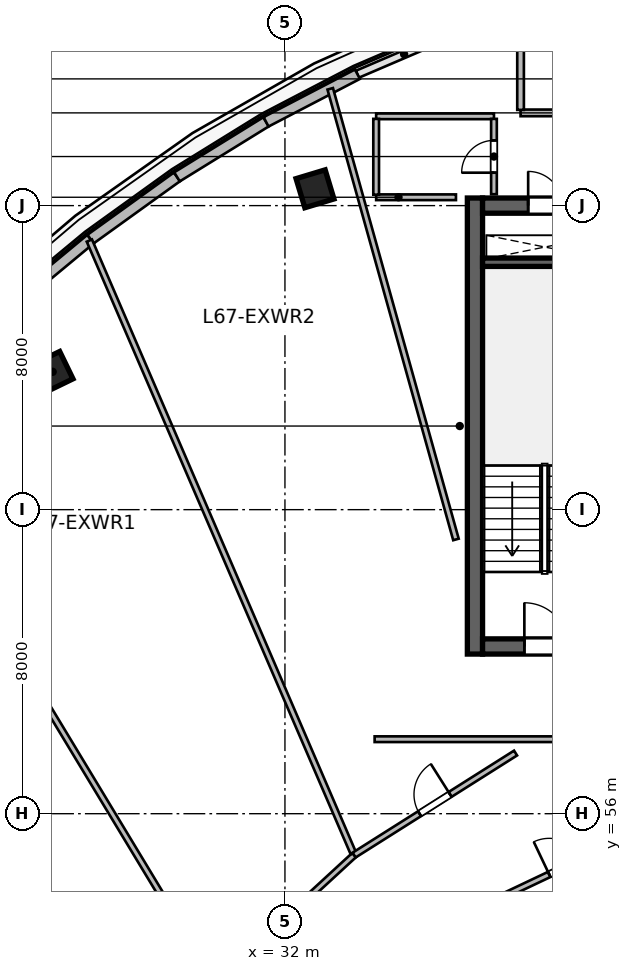
"""IFC4 building model, lengths in metres.
Left out: names, types, materials, properties, quantities, classifications, styles, units other than length and angle.
Written with IfcOpenShell. Run it as: python <this file> out.ifc"""

import sys

from ifc_helpers import new_model, si_unit, direction, frame, frame_2d, origin, origin_2d, place, context, subcontext, project, spatial, rectangle, extrude, source, transform, mapped, element, fill, save


model = new_model("IFC4")
c1 = context("Model", 3, precision=1e-05, world=origin(), true_north=direction((0.0, 1.0)))
c2 = subcontext(c1, "Body", "Model", "MODEL_VIEW")
j1 = project(units=[si_unit("LENGTHUNIT", "METRE"), si_unit("PLANEANGLEUNIT", "RADIAN")], contexts=[c1])
p1 = place(None, origin())
s1 = spatial("IfcSite", under=j1, at=p1, CompositionType="ELEMENT")
p2 = place(p1, origin())
s2 = spatial("IfcBuilding", under=s1, at=p2, CompositionType="ELEMENT")
p3 = place(p2, frame((0.0, 0.0, 275.7)))
s3 = spatial("IfcBuildingStorey", under=s2, at=p3, CompositionType="ELEMENT", Elevation=275.7)
m1 = source(origin(), c2, "Body", "SweptSolid", [
    extrude(rectangle(XDim=12.0, YDim=0.4, at=frame_2d((6.0, 0.0))), origin(), (0.0, 0.0, 1.0), 3.9),
])
p4 = place(p3, frame((37.0, 60.2, 0.0), z_axis=(0.0, 0.0, 1.0), x_axis=(0.0, 1.0, 0.0)))
e1 = element("IfcWall", 1, at=p4, inside=s3, PredefinedType="SHEAR", context=c2, shape_type="MappedRepresentation", body=[
    mapped(m1, transform((0.0, 0.0, 0.0), scale=1.0)),
])
m2 = source(origin(), c2, "Body", "SweptSolid", [
    extrude(rectangle(XDim=21.6, YDim=0.4, at=frame_2d((10.8, 0.0))), origin(), (0.0, 0.0, 1.0), 3.9),
])
p5 = place(p3, frame((37.2, 60.4, 0.0), z_axis=(0.0, 0.0, 1.0), x_axis=(1.0, 0.0, 0.0)))
e2 = element("IfcWall", 2, at=p5, inside=s3, PredefinedType="SHEAR", context=c2, shape_type="MappedRepresentation", body=[
    mapped(m2, transform((0.0, 0.0, 0.0), scale=1.0)),
])
p6 = place(p5, frame((1.1, 0.0, 0.0)))
e3 = element("IfcOpeningElement", 3, at=p6, cuts=e2, PredefinedType="OPENING", context=c2, shape_type="SweptSolid", body=[
    extrude(rectangle(XDim=1.15, YDim=2.15, at=frame_2d((0.575, 1.075))), frame((0.0, 0.21, 0.0), z_axis=(0.0, -1.0, 0.0), x_axis=(1.0, 0.0, 0.0)), (0.0, 0.0, 1.0), 0.42),
])
p7 = place(p5, frame((19.5, 0.0, 0.0)))
e4 = element("IfcOpeningElement", 4, at=p7, cuts=e2, PredefinedType="OPENING", context=c2, shape_type="SweptSolid", body=[
    extrude(rectangle(XDim=0.9, YDim=2.1, at=frame_2d((0.45, 1.05))), frame((0.0, 0.21, 0.0), z_axis=(0.0, -1.0, 0.0), x_axis=(1.0, 0.0, 0.0)), (0.0, 0.0, 1.0), 0.42),
])
p8 = place(p5, frame((12.02, 0.0, 0.0)))
e5 = element("IfcOpeningElement", 5, at=p8, cuts=e2, PredefinedType="OPENING", context=c2, shape_type="SweptSolid", body=[
    extrude(rectangle(XDim=1.6, YDim=2.15, at=frame_2d((0.8, 1.075))), frame((0.0, 0.21, 0.0), z_axis=(0.0, -1.0, 0.0), x_axis=(1.0, 0.0, 0.0)), (0.0, 0.0, 1.0), 0.42),
])
p9 = place(p3, frame((37.2, 72.0, 0.0), z_axis=(0.0, 0.0, 1.0), x_axis=(1.0, 0.0, 0.0)))
e6 = element("IfcWall", 6, at=p9, inside=s3, PredefinedType="SHEAR", context=c2, shape_type="MappedRepresentation", body=[
    mapped(m2, transform((0.0, 0.0, 0.0), scale=1.0)),
])
p10 = place(p9, frame((1.2, 0.0, 0.0)))
e7 = element("IfcOpeningElement", 7, at=p10, cuts=e6, PredefinedType="OPENING", context=c2, shape_type="SweptSolid", body=[
    extrude(rectangle(XDim=0.9, YDim=2.1, at=frame_2d((0.45, 1.05))), frame((0.0, 0.21, 0.0), z_axis=(0.0, -1.0, 0.0), x_axis=(1.0, 0.0, 0.0)), (0.0, 0.0, 1.0), 0.42),
])
p11 = place(p9, frame((14.7, 0.0, 0.0)))
e8 = element("IfcOpeningElement", 8, at=p11, cuts=e6, PredefinedType="OPENING", context=c2, shape_type="SweptSolid", body=[
    extrude(rectangle(XDim=1.2, YDim=2.15, at=frame_2d((0.6, 1.075))), frame((0.0, 0.21, 0.0), z_axis=(0.0, -1.0, 0.0), x_axis=(1.0, 0.0, 0.0)), (0.0, 0.0, 1.0), 0.42),
])
p12 = place(p9, frame((4.15, 0.0, 0.0)))
e9 = element("IfcOpeningElement", 9, at=p12, cuts=e6, PredefinedType="OPENING", context=c2, shape_type="SweptSolid", body=[
    extrude(rectangle(XDim=1.3, YDim=2.15, at=frame_2d((0.65, 1.075))), frame((0.0, 0.21, 0.0), z_axis=(0.0, -1.0, 0.0), x_axis=(1.0, 0.0, 0.0)), (0.0, 0.0, 1.0), 0.42),
])
p13 = place(p9, frame((6.76, 0.0, 0.0)))
e10 = element("IfcOpeningElement", 10, at=p13, cuts=e6, PredefinedType="OPENING", context=c2, shape_type="SweptSolid", body=[
    extrude(rectangle(XDim=0.85, YDim=2.1, at=frame_2d((0.425, 1.05))), frame((0.0, 0.21, 0.0), z_axis=(0.0, -1.0, 0.0), x_axis=(1.0, 0.0, 0.0)), (0.0, 0.0, 1.0), 0.42),
])
p14 = place(p9, frame((8.76, 0.0, 0.0)))
e11 = element("IfcOpeningElement", 11, at=p14, cuts=e6, PredefinedType="OPENING", context=c2, shape_type="SweptSolid", body=[
    extrude(rectangle(XDim=0.85, YDim=2.1, at=frame_2d((0.425, 1.05))), frame((0.0, 0.21, 0.0), z_axis=(0.0, -1.0, 0.0), x_axis=(1.0, 0.0, 0.0)), (0.0, 0.0, 1.0), 0.42),
])
p15 = place(p9, frame((10.725, 0.0, 0.0)))
e12 = element("IfcOpeningElement", 12, at=p15, cuts=e6, PredefinedType="OPENING", context=c2, shape_type="SweptSolid", body=[
    extrude(rectangle(XDim=0.85, YDim=2.1, at=frame_2d((0.425, 1.05))), frame((0.0, 0.21, 0.0), z_axis=(0.0, -1.0, 0.0), x_axis=(1.0, 0.0, 0.0)), (0.0, 0.0, 1.0), 0.42),
])
m3 = source(origin(), c2, "Body", "SweptSolid", [
    extrude(rectangle(XDim=3.27, YDim=0.22, at=frame_2d((1.635, 0.0))), origin(), (0.0, 0.0, 1.0), 3.9),
])
p16 = place(p3, frame((37.2, 70.51, 0.0), z_axis=(0.0, 0.0, 1.0), x_axis=(1.0, 0.0, 0.0)))
e13 = element("IfcWall", 13, at=p16, inside=s3, PredefinedType="SHEAR", context=c2, shape_type="MappedRepresentation", body=[
    mapped(m3, transform((0.0, 0.0, 0.0), scale=1.0)),
])
m4 = source(origin(), c2, "Body", "SweptSolid", [
    extrude(rectangle(XDim=0.8, YDim=0.8, at=origin_2d()), origin(), (0.0, 0.0, 1.0), 3.9),
])
for number, where, z_axis, x_axis in (
    (14, (25.888, 67.627, 0.0), (0.0, 0.0, 1.0), (-0.436, 0.9, 0.0)),
    (15, (32.791, 72.442, 0.0), (0.0, 0.0, 1.0), (-0.289, 0.957, 0.0)),
):
    element("IfcColumn", number, at=place(p3, frame(where, z_axis=z_axis, x_axis=x_axis)), inside=s3, PredefinedType="COLUMN", context=c2, shape_type="MappedRepresentation", body=[
        mapped(m4, transform((0.0, 0.0, 0.0), scale=1.0)),
    ])
m5 = source(origin(), c2, "Body", "SweptSolid", [
    extrude(rectangle(XDim=2.852, YDim=0.28, at=frame_2d((1.426, 0.0))), origin(), (0.0, 0.0, 1.0), 3.64),
])
p17 = place(p3, frame((24.69, 69.299, 0.0), z_axis=(0.0, 0.0, 1.0), x_axis=(0.769783606009, 0.638304942735, 0.0)))
e16 = element("IfcWall", 16, at=p17, inside=s3, PredefinedType="SOLIDWALL", context=c2, shape_type="MappedRepresentation", body=[
    mapped(m5, transform((0.0, 0.0, 0.0), scale=1.0)),
])
m6 = source(origin(), c2, "Body", "SweptSolid", [
    extrude(rectangle(XDim=2.802, YDim=0.28, at=frame_2d((1.401, 0.0))), origin(), (0.0, 0.0, 1.0), 3.64),
])
p18 = place(p3, frame((26.885, 71.12, 0.0), z_axis=(0.0, 0.0, 1.0), x_axis=(0.811507896482, 0.584341453217, 0.0)))
e17 = element("IfcWall", 17, at=p18, inside=s3, PredefinedType="SOLIDWALL", context=c2, shape_type="MappedRepresentation", body=[
    mapped(m6, transform((0.0, 0.0, 0.0), scale=1.0)),
])
m7 = source(origin(), c2, "Body", "SweptSolid", [
    extrude(rectangle(XDim=2.755, YDim=0.28, at=frame_2d((1.377, 0.0))), origin(), (0.0, 0.0, 1.0), 3.64),
])
p19 = place(p3, frame((29.159, 72.757, 0.0), z_axis=(0.0, 0.0, 1.0), x_axis=(0.850750210743, 0.525570241661, 0.0)))
e18 = element("IfcWall", 18, at=p19, inside=s3, PredefinedType="SOLIDWALL", context=c2, shape_type="MappedRepresentation", body=[
    mapped(m7, transform((0.0, 0.0, 0.0), scale=1.0)),
])
m8 = source(origin(), c2, "Body", "SweptSolid", [
    extrude(rectangle(XDim=2.711, YDim=0.28, at=frame_2d((1.356, 0.0))), origin(), (0.0, 0.0, 1.0), 3.64),
])
p20 = place(p3, frame((31.502, 74.205, 0.0), z_axis=(0.0, 0.0, 1.0), x_axis=(0.886828760751, 0.462098202881, 0.0)))
e19 = element("IfcWall", 19, at=p20, inside=s3, PredefinedType="SOLIDWALL", context=c2, shape_type="MappedRepresentation", body=[
    mapped(m8, transform((0.0, 0.0, 0.0), scale=1.0)),
])
m9 = source(origin(), c2, "Body", "SweptSolid", [
    extrude(rectangle(XDim=2.1, YDim=0.15, at=frame_2d((1.05, 0.0))), origin(), (0.0, 0.0, 1.0), 3.64),
])
p21 = place(p3, frame((34.4, 72.22, 0.0), z_axis=(0.0, 0.0, 1.0), x_axis=(1.0, 0.0, 0.0)))
e20 = element("IfcWall", 20, at=p21, inside=s3, PredefinedType="PARTITIONING", context=c2, shape_type="MappedRepresentation", body=[
    mapped(m9, transform((0.0, 0.0, 0.0), scale=1.0)),
])
m10 = source(origin(), c2, "Body", "SweptSolid", [
    extrude(rectangle(XDim=3.1, YDim=0.15, at=frame_2d((1.55, 0.0))), origin(), (0.0, 0.0, 1.0), 3.071),
])
p22 = place(p3, frame((34.4, 74.35, 0.0), z_axis=(0.0, 0.0, 1.0), x_axis=(1.0, 0.0, 0.0)))
e21 = element("IfcWall", 21, at=p22, inside=s3, PredefinedType="PARTITIONING", context=c2, shape_type="MappedRepresentation", body=[
    mapped(m10, transform((0.0, 0.0, 0.0), scale=1.0)),
])
m11 = source(origin(), c2, "Body", "SweptSolid", [
    extrude(rectangle(XDim=1.995, YDim=0.15, at=frame_2d((0.998, 0.0))), origin(), (0.0, 0.0, 1.0), 3.64),
])
p23 = place(p3, frame((34.4, 72.288, 0.0), z_axis=(0.0, 0.0, 1.0), x_axis=(0.0, 1.0, 0.0)))
e22 = element("IfcWall", 22, at=p23, inside=s3, PredefinedType="PARTITIONING", context=c2, shape_type="MappedRepresentation", body=[
    mapped(m11, transform((0.0, 0.0, 0.0), scale=1.0)),
])
m12 = source(origin(), c2, "Body", "SweptSolid", [
    extrude(rectangle(XDim=1.982, YDim=0.15, at=frame_2d((0.991, 0.0))), origin(), (0.0, 0.0, 1.0), 3.64),
])
p24 = place(p3, frame((37.5, 72.3, 0.0), z_axis=(0.0, 0.0, 1.0), x_axis=(0.0, 1.0, 0.0)))
e23 = element("IfcWall", 23, at=p24, inside=s3, PredefinedType="PARTITIONING", context=c2, shape_type="MappedRepresentation", body=[
    mapped(m12, transform((0.0, 0.0, 0.0), scale=1.0)),
])
p25 = place(p24, frame((0.566, 0.0, 0.0)))
e24 = element("IfcOpeningElement", 24, at=p25, cuts=e23, PredefinedType="OPENING", context=c2, shape_type="SweptSolid", body=[
    extrude(rectangle(XDim=0.85, YDim=2.1, at=frame_2d((0.425, 1.05))), frame((0.0, 0.085, 0.0), z_axis=(0.0, -1.0, 0.0), x_axis=(1.0, 0.0, 0.0)), (0.0, 0.0, 1.0), 0.17),
])
m13 = source(origin(), c2, "Body", "SweptSolid", [
    extrude(rectangle(XDim=4.0, YDim=0.175, at=frame_2d((2.0, 0.0))), origin(), (0.0, 0.0, 1.0), 3.64),
])
p26 = place(p3, frame((38.2, 74.44, 0.0), z_axis=(0.0, 0.0, 1.0), x_axis=(1.0, 0.0, 0.0)))
e25 = element("IfcWall", 25, at=p26, inside=s3, PredefinedType="PARTITIONING", context=c2, shape_type="MappedRepresentation", body=[
    mapped(m13, transform((0.0, 0.0, 0.0), scale=1.0)),
])
p27 = place(p26, frame((2.7, 0.0, 0.0)))
e26 = element("IfcOpeningElement", 26, at=p27, cuts=e25, PredefinedType="OPENING", context=c2, shape_type="SweptSolid", body=[
    extrude(rectangle(XDim=0.9, YDim=2.08, at=frame_2d((0.45, 1.04))), frame((0.0, 0.098, 0.0), z_axis=(0.0, -1.0, 0.0), x_axis=(1.0, 0.0, 0.0)), (0.0, 0.0, 1.0), 0.195),
])
m14 = source(origin(), c2, "Body", "SweptSolid", [
    extrude(rectangle(XDim=2.403, YDim=0.175, at=frame_2d((1.201, 0.0))), origin(), (0.0, 0.0, 1.0), 3.64),
])
p28 = place(p3, frame((38.2, 74.519, 0.0), z_axis=(0.0, 0.0, 1.0), x_axis=(0.0, 1.0, 0.0)))
e27 = element("IfcWall", 27, at=p28, inside=s3, PredefinedType="PARTITIONING", context=c2, shape_type="MappedRepresentation", body=[
    mapped(m14, transform((0.0, 0.0, 0.0), scale=1.0)),
])
m15 = source(origin(), c2, "Body", "SweptSolid", [
    extrude(rectangle(XDim=6.137, YDim=0.15, at=frame_2d((3.069, 0.0))), origin(), (0.0, 0.0, 1.0), 3.64),
])
p29 = place(p3, frame((36.611, 53.29, 0.0), z_axis=(0.0, 0.0, 1.0), x_axis=(0.903442784804, 0.428708682657, 0.0)))
e28 = element("IfcWall", 28, at=p29, inside=s3, PredefinedType="PARTITIONING", context=c2, shape_type="MappedRepresentation", body=[
    mapped(m15, transform((0.0, 0.0, 0.0), scale=1.0)),
])
p30 = place(p29, frame((2.594, 0.0, 0.0)))
e29 = element("IfcOpeningElement", 29, at=p30, cuts=e28, PredefinedType="OPENING", context=c2, shape_type="SweptSolid", body=[
    extrude(rectangle(XDim=0.95, YDim=2.1, at=frame_2d((0.475, 1.05))), frame((0.0, 0.085, 0.0), z_axis=(0.0, -1.0, 0.0), x_axis=(1.0, 0.0, 0.0)), (0.0, 0.0, 1.0), 0.17),
])
m16 = source(origin(), c2, "Body", "SweptSolid", [
    extrude(rectangle(XDim=4.986, YDim=0.15, at=frame_2d((2.493, 0.0))), origin(), (0.0, 0.0, 1.0), 3.64),
])
p31 = place(p3, frame((30.153, 51.533, 0.0), z_axis=(0.0, 0.0, 1.0), x_axis=(0.735595190169, 0.677421372707, 0.0)))
e30 = element("IfcWall", 30, at=p31, inside=s3, PredefinedType="PARTITIONING", context=c2, shape_type="MappedRepresentation", body=[
    mapped(m16, transform((0.0, 0.0, 0.0), scale=1.0)),
])
p32 = place(p31, frame((2.018, 0.0, 0.0)))
e31 = element("IfcOpeningElement", 31, at=p32, cuts=e30, PredefinedType="OPENING", context=c2, shape_type="SweptSolid", body=[
    extrude(rectangle(XDim=0.95, YDim=2.1, at=frame_2d((0.475, 1.05))), frame((0.0, 0.085, 0.0), z_axis=(0.0, -1.0, 0.0), x_axis=(1.0, 0.0, 0.0)), (0.0, 0.0, 1.0), 0.17),
])
m17 = source(origin(), c2, "Body", "SweptSolid", [
    extrude(rectangle(XDim=16.121, YDim=0.15, at=frame_2d((8.061, 0.0))), origin(), (0.0, 0.0, 1.0), 3.64),
])
p33 = place(p3, frame((30.127, 51.575, 0.0), z_axis=(0.0, 0.0, 1.0), x_axis=(-0.517212483904, 0.855857024563, 0.0)))
e32 = element("IfcWall", 32, at=p33, inside=s3, PredefinedType="PARTITIONING", context=c2, shape_type="MappedRepresentation", body=[
    mapped(m17, transform((0.0, 0.0, 0.0), scale=1.0)),
])
m18 = source(origin(), c2, "Body", "SweptSolid", [
    extrude(rectangle(XDim=17.556, YDim=0.15, at=frame_2d((8.778, 0.0))), origin(), (0.0, 0.0, 1.0), 3.64),
])
p34 = place(p3, frame((33.8, 54.958, 0.0), z_axis=(0.0, 0.0, 1.0), x_axis=(-0.395687598313, 0.918385172213, 0.0)))
e33 = element("IfcWall", 33, at=p34, inside=s3, PredefinedType="PARTITIONING", context=c2, shape_type="MappedRepresentation", body=[
    mapped(m18, transform((0.0, 0.0, 0.0), scale=1.0)),
])
m19 = source(origin(), c2, "Body", "SweptSolid", [
    extrude(rectangle(XDim=5.025, YDim=0.15, at=frame_2d((2.513, 0.0))), origin(), (0.0, 0.0, 1.0), 3.64),
])
p35 = place(p3, frame((33.82, 54.911, 0.0), z_axis=(0.0, 0.0, 1.0), x_axis=(0.84532378062, 0.534254345717, 0.0)))
e34 = element("IfcWall", 34, at=p35, inside=s3, PredefinedType="PARTITIONING", context=c2, shape_type="MappedRepresentation", body=[
    mapped(m19, transform((0.0, 0.0, 0.0), scale=1.0)),
])
p36 = place(p35, frame((2.038, 0.0, 0.0)))
e35 = element("IfcOpeningElement", 35, at=p36, cuts=e34, PredefinedType="OPENING", context=c2, shape_type="SweptSolid", body=[
    extrude(rectangle(XDim=0.95, YDim=2.1, at=frame_2d((0.475, 1.05))), frame((0.0, 0.085, 0.0), z_axis=(0.0, -1.0, 0.0), x_axis=(1.0, 0.0, 0.0)), (0.0, 0.0, 1.0), 0.17),
])
m20 = source(origin(), c2, "Body", "SweptSolid", [
    extrude(rectangle(XDim=12.311, YDim=0.15, at=frame_2d((6.155, 0.0))), origin(), (0.0, 0.0, 1.0), 3.64),
])
p37 = place(p3, frame((36.5, 63.216, 0.0), z_axis=(0.0, 0.0, 1.0), x_axis=(-0.268759602651, 0.963207286093, 0.0)))
e36 = element("IfcWall", 36, at=p37, inside=s3, PredefinedType="PARTITIONING", context=c2, shape_type="MappedRepresentation", body=[
    mapped(m20, transform((0.0, 0.0, 0.0), scale=1.0)),
])
m21 = source(origin(), c2, "Body", "SweptSolid", [
    extrude(rectangle(XDim=12.39, YDim=0.15, at=frame_2d((6.195, 0.0))), origin(), (0.0, 0.0, 1.0), 3.27),
])
p38 = place(p3, frame((34.36, 57.96, 0.0), z_axis=(0.0, 0.0, 1.0), x_axis=(1.0, 0.0, 0.0)))
e37 = element("IfcWall", 37, at=p38, inside=s3, PredefinedType="PARTITIONING", context=c2, shape_type="MappedRepresentation", body=[
    mapped(m21, transform((0.0, 0.0, 0.0), scale=1.0)),
])
m22 = source(origin(), c2, "Body", "SweptSolid", [
    extrude(rectangle(XDim=1.15, YDim=2.15, at=frame_2d((0.575, 1.075))), frame((0.0, 0.025, 0.0), z_axis=(0.0, -1.0, 0.0), x_axis=(1.0, 0.0, 0.0)), (0.0, 0.0, 1.0), 0.05),
])
p39 = place(p6, origin())
e38 = element("IfcDoor", 38, at=p39, inside=s3, OperationType="SINGLE_SWING_LEFT", PredefinedType="DOOR", context=c2, shape_type="MappedRepresentation", body=[
    mapped(m22, transform((0.0, 0.0, 0.0), scale=1.0)),
])
fill(e3, e38)
m23 = source(origin(), c2, "Body", "SweptSolid", [
    extrude(rectangle(XDim=0.9, YDim=2.1, at=frame_2d((0.45, 1.05))), frame((0.0, 0.025, 0.0), z_axis=(0.0, -1.0, 0.0), x_axis=(1.0, 0.0, 0.0)), (0.0, 0.0, 1.0), 0.05),
])
p40 = place(p10, origin())
e39 = element("IfcDoor", 39, at=p40, inside=s3, OperationType="SINGLE_SWING_LEFT", PredefinedType="DOOR", context=c2, shape_type="MappedRepresentation", body=[
    mapped(m23, transform((0.0, 0.0, 0.0), scale=1.0)),
])
fill(e7, e39)
m24 = source(origin(), c2, "Body", "SweptSolid", [
    extrude(rectangle(XDim=0.85, YDim=2.1, at=frame_2d((0.425, 1.05))), frame((0.0, 0.025, 0.0), z_axis=(0.0, -1.0, 0.0), x_axis=(1.0, 0.0, 0.0)), (0.0, 0.0, 1.0), 0.05),
])
p41 = place(p25, origin())
e40 = element("IfcDoor", 40, at=p41, inside=s3, OperationType="SINGLE_SWING_LEFT", PredefinedType="DOOR", context=c2, shape_type="MappedRepresentation", body=[
    mapped(m24, transform((0.0, 0.0, 0.0), scale=1.0)),
])
fill(e24, e40)
m25 = source(origin(), c2, "Body", "SweptSolid", [
    extrude(rectangle(XDim=0.95, YDim=2.1, at=frame_2d((0.475, 1.05))), frame((0.0, 0.025, 0.0), z_axis=(0.0, -1.0, 0.0), x_axis=(1.0, 0.0, 0.0)), (0.0, 0.0, 1.0), 0.05),
])
p42 = place(p30, origin())
e41 = element("IfcDoor", 41, at=p42, inside=s3, OperationType="SINGLE_SWING_LEFT", PredefinedType="DOOR", context=c2, shape_type="MappedRepresentation", body=[
    mapped(m25, transform((0.0, 0.0, 0.0), scale=1.0)),
])
fill(e29, e41)
p43 = place(p36, origin())
e42 = element("IfcDoor", 42, at=p43, inside=s3, OperationType="SINGLE_SWING_RIGHT", PredefinedType="DOOR", context=c2, shape_type="MappedRepresentation", body=[
    mapped(m25, transform((0.0, 0.0, 0.0), scale=1.0)),
])
fill(e35, e42)
save(model, sys.argv[1])
